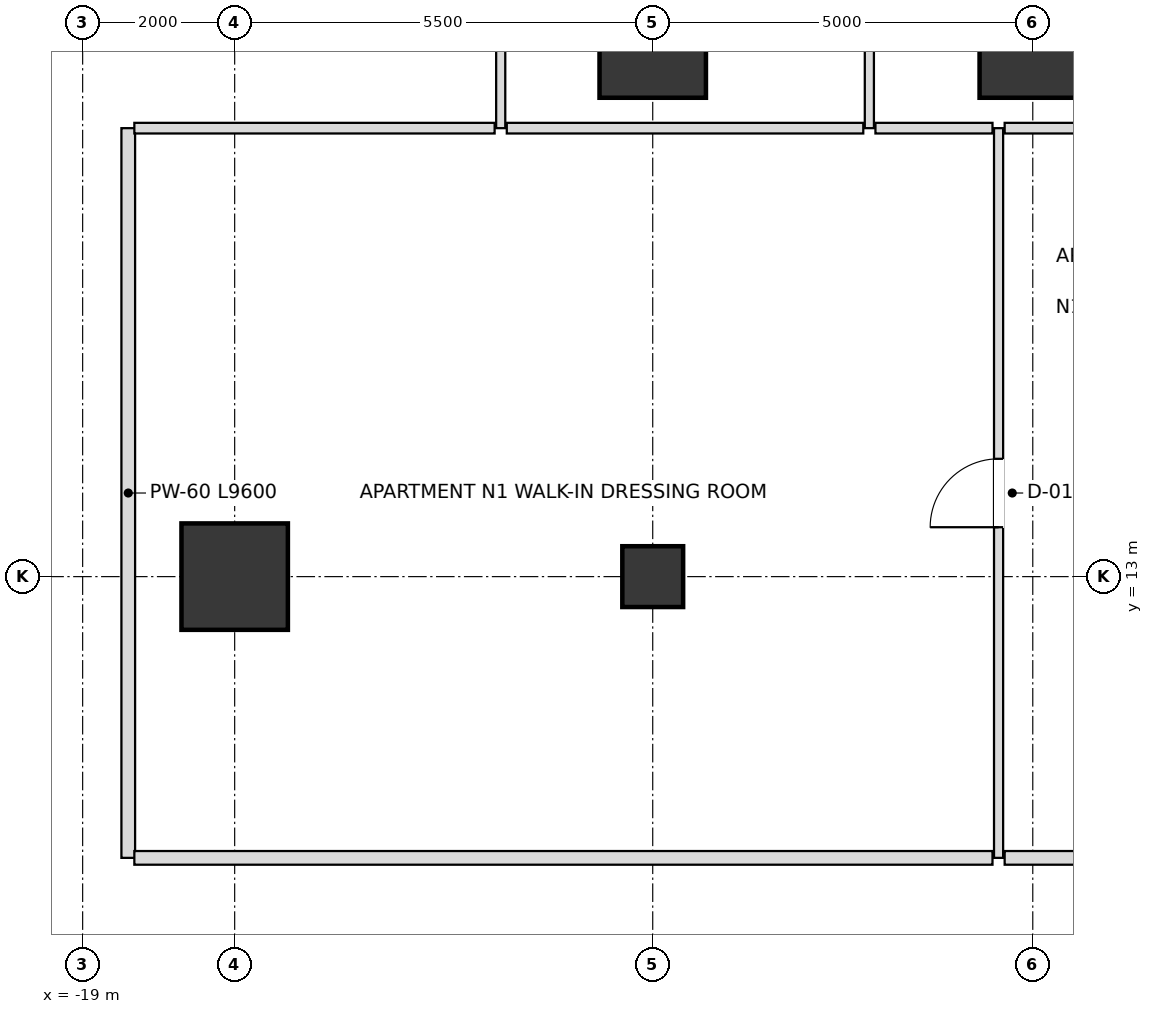
"""IFC4 building model, lengths in metres.
Left out: names, types, materials, properties, quantities, classifications, styles, units other than length and angle.
Written with IfcOpenShell. Run it as: python <this file> out.ifc"""

import sys

from ifc_helpers import new_model, si_unit, direction, frame, frame_2d, origin, origin_2d, place, context, subcontext, project, spatial, rectangle, extrude, element, fill, save


model = new_model("IFC4")
c1 = context("Model", 3, precision=1e-05, world=origin(), true_north=direction((0.0, 1.0)))
c2 = subcontext(c1, "Body", "Model", "MODEL_VIEW")
j1 = project(units=[si_unit("LENGTHUNIT", "METRE"), si_unit("PLANEANGLEUNIT", "RADIAN")], contexts=[c1])
p1 = place(None, origin())
s1 = spatial("IfcSite", under=j1, at=p1, CompositionType="ELEMENT")
p2 = place(p1, origin())
s2 = spatial("IfcBuilding", under=s1, at=p2, CompositionType="ELEMENT")
p3 = place(p2, frame((0.0, 0.0, 61.2)))
s3 = spatial("IfcBuildingStorey", under=s2, at=p3, CompositionType="ELEMENT", Elevation=61.2)
for number, where, z_axis, x_axis in (
    (1, (-6.5, 20.0, 0.0), (0.0, 0.0, 1.0), (1.0, 0.0, 0.0)),
    (2, (-11.5, 20.0, 0.0), (0.0, 0.0, 1.0), (1.0, 0.0, 0.0)),
    (3, (-17.0, 13.0, 0.0), (0.0, 0.0, 1.0), (1.0, 0.0, 0.0)),
):
    element("IfcColumn", number, at=place(p3, frame(where, z_axis=z_axis, x_axis=x_axis)), inside=s3, PredefinedType="USERDEFINED", context=c2, shape_type="SweptSolid", body=[
        extrude(rectangle(XDim=1.4, YDim=1.4, at=origin_2d()), origin(), (0.0, 0.0, 1.0), 3.6),
    ])
p4 = place(p3, frame((-11.5, 13.0, 0.0), z_axis=(0.0, 0.0, 1.0), x_axis=(1.0, 0.0, 0.0)))
e4 = element("IfcColumn", 4, at=p4, inside=s3, PredefinedType="COLUMN", context=c2, shape_type="SweptSolid", body=[
    extrude(rectangle(XDim=0.8, YDim=0.8, at=origin_2d()), origin(), (0.0, 0.0, 1.0), 3.6),
])
p5 = place(p3, frame((-18.4, 9.3, 0.0), z_axis=(0.0, 0.0, 1.0), x_axis=(0.0, 1.0, 0.0)))
e5 = element("IfcWall", 5, at=p5, inside=s3, PredefinedType="PARTITIONING", context=c2, shape_type="SweptSolid", body=[
    extrude(rectangle(XDim=9.6, YDim=0.18, at=frame_2d((4.8, 0.0))), origin(), (0.0, 0.0, 1.0), 2.736),
])
p6 = place(p3, frame((-13.5, 18.9, 0.0), z_axis=(0.0, 0.0, 1.0), x_axis=(0.0, 1.0, 0.0)))
e6 = element("IfcWall", 6, at=p6, inside=s3, PredefinedType="PARTITIONING", context=c2, shape_type="SweptSolid", body=[
    extrude(rectangle(XDim=6.0, YDim=0.12, at=frame_2d((3.0, 0.0))), origin(), (0.0, 0.0, 1.0), 2.736),
])
p7 = place(p6, frame((2.55, 0.0, 0.0)))
e7 = element("IfcOpeningElement", 7, at=p7, cuts=e6, PredefinedType="OPENING", context=c2, shape_type="SweptSolid", body=[
    extrude(rectangle(XDim=0.9, YDim=2.1, at=frame_2d((0.45, 1.05))), frame((0.0, 0.07, 0.0), z_axis=(0.0, -1.0, 0.0), x_axis=(1.0, 0.0, 0.0)), (0.0, 0.0, 1.0), 0.14),
])
p8 = place(p3, frame((-8.65, 18.9, 0.0), z_axis=(0.0, 0.0, 1.0), x_axis=(0.0, 1.0, 0.0)))
e8 = element("IfcWall", 8, at=p8, inside=s3, PredefinedType="PARTITIONING", context=c2, shape_type="SweptSolid", body=[
    extrude(rectangle(XDim=6.0, YDim=0.12, at=frame_2d((3.0, 0.0))), origin(), (0.0, 0.0, 1.0), 2.816),
])
p9 = place(p8, frame((2.55, 0.0, 0.0)))
e9 = element("IfcOpeningElement", 9, at=p9, cuts=e8, PredefinedType="OPENING", context=c2, shape_type="SweptSolid", body=[
    extrude(rectangle(XDim=0.9, YDim=2.1, at=frame_2d((0.45, 1.05))), frame((0.0, 0.07, 0.0), z_axis=(0.0, -1.0, 0.0), x_axis=(1.0, 0.0, 0.0)), (0.0, 0.0, 1.0), 0.14),
])
p10 = place(p3, frame((-6.95, 9.3, 0.0), z_axis=(0.0, 0.0, 1.0), x_axis=(0.0, 1.0, 0.0)))
e10 = element("IfcWall", 10, at=p10, inside=s3, PredefinedType="PARTITIONING", context=c2, shape_type="SweptSolid", body=[
    extrude(rectangle(XDim=9.6, YDim=0.12, at=frame_2d((4.8, 0.0))), origin(), (0.0, 0.0, 1.0), 2.816),
])
p11 = place(p10, frame((4.35, 0.0, 0.0)))
e11 = element("IfcOpeningElement", 11, at=p11, cuts=e10, PredefinedType="OPENING", context=c2, shape_type="SweptSolid", body=[
    extrude(rectangle(XDim=0.9, YDim=2.1, at=frame_2d((0.45, 1.05))), frame((0.0, 0.07, 0.0), z_axis=(0.0, -1.0, 0.0), x_axis=(1.0, 0.0, 0.0)), (0.0, 0.0, 1.0), 0.14),
])
p12 = place(p3, frame((-18.32, 9.3, 0.0), z_axis=(0.0, 0.0, 1.0), x_axis=(1.0, 0.0, 0.0)))
e12 = element("IfcWall", 12, at=p12, inside=s3, PredefinedType="PARTITIONING", context=c2, shape_type="SweptSolid", body=[
    extrude(rectangle(XDim=11.29, YDim=0.18, at=frame_2d((5.645, 0.0))), origin(), (0.0, 0.0, 1.0), 2.816),
])
p13 = place(p3, frame((-6.87, 9.3, 0.0), z_axis=(0.0, 0.0, 1.0), x_axis=(1.0, 0.0, 0.0)))
e13 = element("IfcWall", 13, at=p13, inside=s3, PredefinedType="PARTITIONING", context=c2, shape_type="SweptSolid", body=[
    extrude(rectangle(XDim=3.04, YDim=0.18, at=frame_2d((1.52, 0.0))), origin(), (0.0, 0.0, 1.0), 2.816),
])
p14 = place(p3, frame((-18.32, 18.9, 0.0), z_axis=(0.0, 0.0, 1.0), x_axis=(1.0, 0.0, 0.0)))
e14 = element("IfcWall", 14, at=p14, inside=s3, PredefinedType="PARTITIONING", context=c2, shape_type="SweptSolid", body=[
    extrude(rectangle(XDim=4.74, YDim=0.14, at=frame_2d((2.37, 0.0))), origin(), (0.0, 0.0, 1.0), 2.736),
])
p15 = place(p3, frame((-13.42, 18.9, 0.0), z_axis=(0.0, 0.0, 1.0), x_axis=(1.0, 0.0, 0.0)))
e15 = element("IfcWall", 15, at=p15, inside=s3, PredefinedType="PARTITIONING", context=c2, shape_type="SweptSolid", body=[
    extrude(rectangle(XDim=4.69, YDim=0.14, at=frame_2d((2.345, 0.0))), origin(), (0.0, 0.0, 1.0), 2.736),
])
p16 = place(p3, frame((-8.57, 18.9, 0.0), z_axis=(0.0, 0.0, 1.0), x_axis=(1.0, 0.0, 0.0)))
e16 = element("IfcWall", 16, at=p16, inside=s3, PredefinedType="PARTITIONING", context=c2, shape_type="SweptSolid", body=[
    extrude(rectangle(XDim=1.54, YDim=0.14, at=frame_2d((0.77, 0.0))), origin(), (0.0, 0.0, 1.0), 3.38),
])
p17 = place(p3, frame((-6.87, 18.9, 0.0), z_axis=(0.0, 0.0, 1.0), x_axis=(1.0, 0.0, 0.0)))
e17 = element("IfcWall", 17, at=p17, inside=s3, PredefinedType="PARTITIONING", context=c2, shape_type="SweptSolid", body=[
    extrude(rectangle(XDim=3.04, YDim=0.14, at=frame_2d((1.52, 0.0))), origin(), (0.0, 0.0, 1.0), 2.816),
])
p18 = place(p11, origin())
e18 = element("IfcDoor", 18, at=p18, inside=s3, OperationType="SINGLE_SWING_LEFT", PredefinedType="DOOR", context=c2, shape_type="SweptSolid", body=[
    extrude(rectangle(XDim=0.9, YDim=2.1, at=frame_2d((0.45, 1.05))), frame((0.0, 0.025, 0.0), z_axis=(0.0, -1.0, 0.0), x_axis=(1.0, 0.0, 0.0)), (0.0, 0.0, 1.0), 0.05),
])
fill(e11, e18)
save(model, sys.argv[1])
